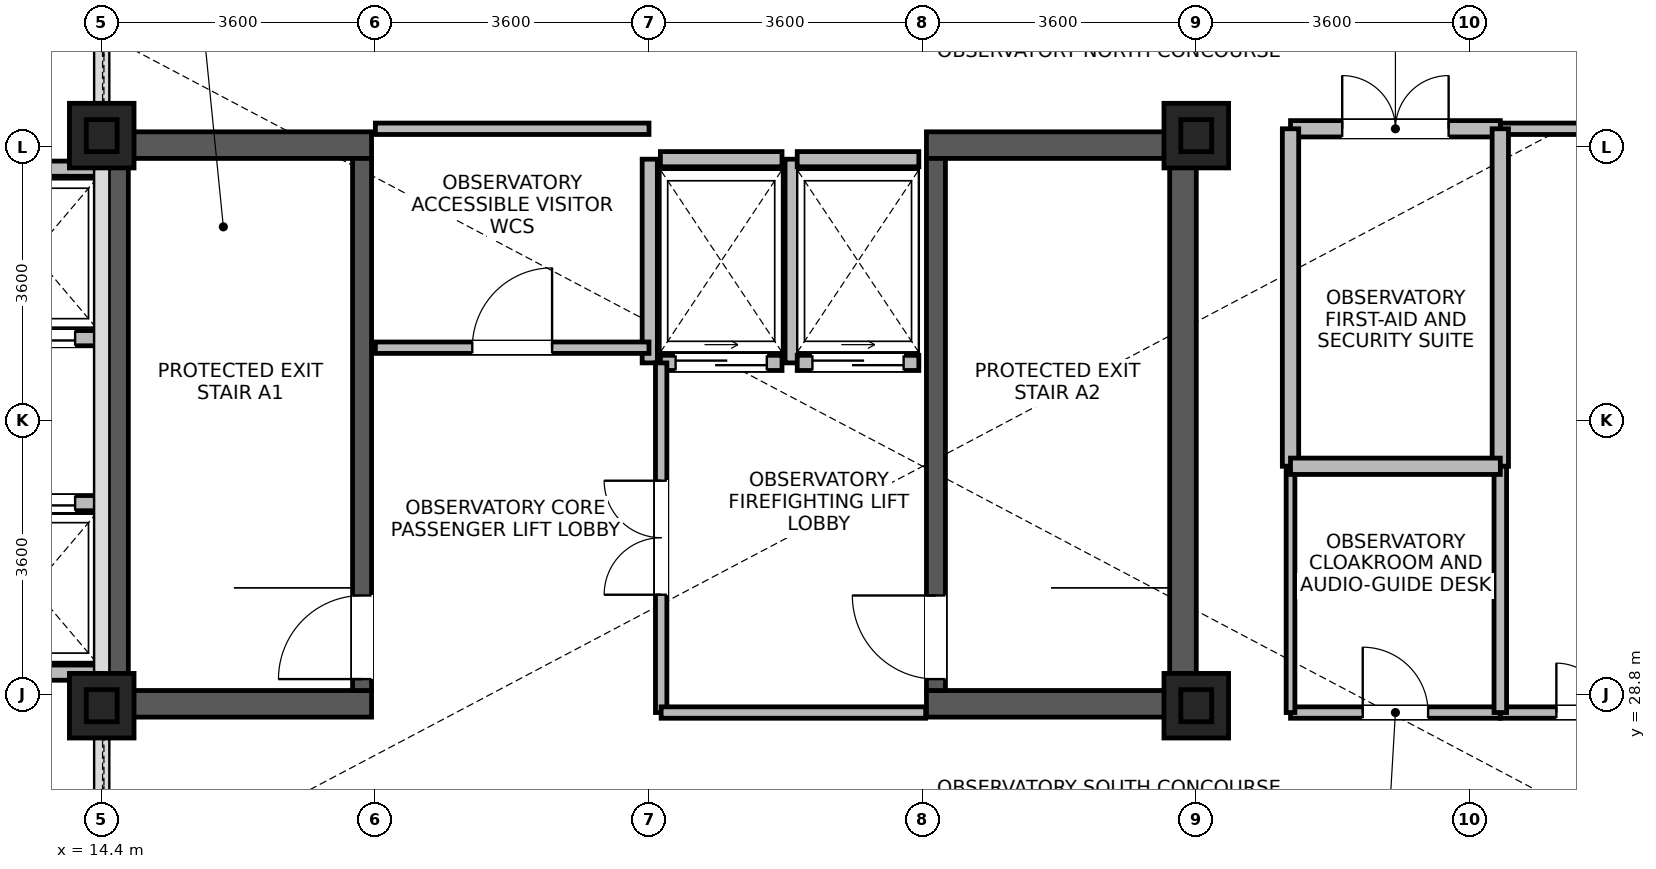
"""IFC4 building model, lengths in metres.
Left out: names, types, materials, properties, quantities, classifications, styles, units other than length and angle.
Written with IfcOpenShell. Run it as: python <this file> out.ifc"""

import sys

from ifc_helpers import new_model, si_unit, direction, frame, frame_2d, origin, origin_2d, place, context, subcontext, project, spatial, rectangle, i_section, extrude, source, transform, mapped, element, fill, save


model = new_model("IFC4")
c1 = context("Model", 3, precision=1e-05, world=origin(), true_north=direction((0.0, 1.0)))
c2 = subcontext(c1, "Body", "Model", "MODEL_VIEW")
j1 = project(units=[si_unit("LENGTHUNIT", "METRE"), si_unit("PLANEANGLEUNIT", "RADIAN")], contexts=[c1])
p1 = place(None, origin())
s1 = spatial("IfcSite", under=j1, at=p1, CompositionType="ELEMENT")
p2 = place(p1, origin())
s2 = spatial("IfcBuilding", under=s1, at=p2, CompositionType="ELEMENT")
p3 = place(p2, frame((0.0, 0.0, 298.0)))
s3 = spatial("IfcBuildingStorey", under=s2, at=p3, CompositionType="ELEMENT", Elevation=298.0)
for number, where, z_axis, x_axis in (
    (1, (14.575, 28.5, 0.0), (0.0, 0.0, 1.0), (0.0, 1.0, 0.0)),
    (2, (28.625, 28.5, 0.0), (0.0, 0.0, 1.0), (0.0, 1.0, 0.0)),
):
    element("IfcWall", number, at=place(p3, frame(where, z_axis=z_axis, x_axis=x_axis)), inside=s3, PredefinedType="SHEAR", context=c2, shape_type="SweptSolid", body=[
        extrude(rectangle(XDim=7.7, YDim=0.35, at=frame_2d((3.85, 0.0))), origin(), (0.0, 0.0, 1.0), 6.0),
    ])
for number, where, z_axis, x_axis in (
    (3, (14.75, 28.675, 0.0), (0.0, 0.0, 1.0), (1.0, 0.0, 0.0)),
    (4, (25.25, 28.675, 0.0), (0.0, 0.0, 1.0), (1.0, 0.0, 0.0)),
    (5, (14.75, 36.025, 0.0), (0.0, 0.0, 1.0), (1.0, 0.0, 0.0)),
    (6, (25.25, 36.025, 0.0), (0.0, 0.0, 1.0), (1.0, 0.0, 0.0)),
):
    element("IfcWall", number, at=place(p3, frame(where, z_axis=z_axis, x_axis=x_axis)), inside=s3, PredefinedType="SHEAR", context=c2, shape_type="SweptSolid", body=[
        extrude(rectangle(XDim=3.2, YDim=0.35, at=frame_2d((1.6, 0.0))), origin(), (0.0, 0.0, 1.0), 6.0),
    ])
p4 = place(p3, frame((17.825, 28.85, 0.0), z_axis=(0.0, 0.0, 1.0), x_axis=(0.0, 1.0, 0.0)))
e7 = element("IfcWall", 7, at=p4, inside=s3, PredefinedType="SHEAR", context=c2, shape_type="SweptSolid", body=[
    extrude(rectangle(XDim=7.0, YDim=0.25, at=frame_2d((3.5, 0.0))), origin(), (0.0, 0.0, 1.0), 6.0),
])
p5 = place(p4, frame((0.15, 0.0, 0.0)))
e8 = element("IfcOpeningElement", 8, at=p5, cuts=e7, PredefinedType="OPENING", context=c2, shape_type="SweptSolid", body=[
    extrude(rectangle(XDim=1.1, YDim=2.08, at=frame_2d((0.55, 1.04))), frame((0.0, 0.135, 0.0), z_axis=(0.0, -1.0, 0.0), x_axis=(1.0, 0.0, 0.0)), (0.0, 0.0, 1.0), 0.27),
])
p6 = place(p3, frame((25.375, 28.85, 0.0), z_axis=(0.0, 0.0, 1.0), x_axis=(0.0, 1.0, 0.0)))
e9 = element("IfcWall", 9, at=p6, inside=s3, PredefinedType="SHEAR", context=c2, shape_type="SweptSolid", body=[
    extrude(rectangle(XDim=7.0, YDim=0.25, at=frame_2d((3.5, 0.0))), origin(), (0.0, 0.0, 1.0), 6.0),
])
p7 = place(p6, frame((0.15, 0.0, 0.0)))
e10 = element("IfcOpeningElement", 10, at=p7, cuts=e9, PredefinedType="OPENING", context=c2, shape_type="SweptSolid", body=[
    extrude(rectangle(XDim=1.1, YDim=2.08, at=frame_2d((0.55, 1.04))), frame((0.0, 0.135, 0.0), z_axis=(0.0, -1.0, 0.0), x_axis=(1.0, 0.0, 0.0)), (0.0, 0.0, 1.0), 0.27),
])
m1 = source(origin(), c2, "Body", "SweptSolid", [
    extrude(rectangle(XDim=0.85, YDim=0.85, at=origin_2d()), origin(), (0.0, 0.0, 1.0), 6.0),
])
for number, where, z_axis, x_axis in (
    (11, (14.4, 28.65, 0.0), (0.0, 0.0, 1.0), (1.0, 0.0, 0.0)),
    (12, (14.4, 36.15, 0.0), (0.0, 0.0, 1.0), (1.0, 0.0, 0.0)),
    (13, (28.8, 28.65, 0.0), (0.0, 0.0, 1.0), (1.0, 0.0, 0.0)),
    (14, (28.8, 36.15, 0.0), (0.0, 0.0, 1.0), (1.0, 0.0, 0.0)),
):
    element("IfcColumn", number, at=place(p3, frame(where, z_axis=z_axis, x_axis=x_axis)), inside=s3, PredefinedType="COLUMN", context=c2, shape_type="MappedRepresentation", body=[
        mapped(m1, transform((0.0, 0.0, 0.0), x_axis=(1.0, 0.0, 0.0), y_axis=(0.0, 1.0, 0.0), z_axis=(0.0, 0.0, 1.0), scale=1.0)),
    ])
m2 = source(origin(), c2, "Body", "SweptSolid", [
    extrude(i_section(OverallWidth=0.406, OverallDepth=0.422, WebThickness=0.023, FlangeThickness=0.031, FilletRadius=0.015, at=origin_2d()), origin(), (0.0, 0.0, 1.0), 28.41),
])
p8 = place(p3, frame((14.4, 28.65, 6.0), z_axis=(0.0, 0.0, 1.0), x_axis=(1.0, 0.0, 0.0)))
e15 = element("IfcColumn", 15, at=p8, inside=s3, PredefinedType="COLUMN", context=c2, shape_type="MappedRepresentation", body=[
    mapped(m2, transform((0.0, 0.0, 0.0), x_axis=(1.0, 0.0, 0.0), y_axis=(0.0, 1.0, 0.0), z_axis=(0.0, 0.0, 1.0), scale=1.0)),
])
m3 = source(origin(), c2, "Body", "SweptSolid", [
    extrude(i_section(OverallWidth=0.406, OverallDepth=0.422, WebThickness=0.023, FlangeThickness=0.031, FilletRadius=0.015, at=origin_2d()), origin(), (0.0, 0.0, 1.0), 29.81),
])
for number, where, z_axis, x_axis in (
    (16, (28.8, 28.65, 6.0), (0.0, 0.0, 1.0), (1.0, 0.0, 0.0)),
    (17, (28.8, 36.15, 6.0), (0.0, 0.0, 1.0), (1.0, 0.0, 0.0)),
):
    element("IfcColumn", number, at=place(p3, frame(where, z_axis=z_axis, x_axis=x_axis)), inside=s3, PredefinedType="COLUMN", context=c2, shape_type="MappedRepresentation", body=[
        mapped(m3, transform((0.0, 0.0, 0.0), x_axis=(1.0, 0.0, 0.0), y_axis=(0.0, 1.0, 0.0), z_axis=(0.0, 0.0, 1.0), scale=1.0)),
    ])
p9 = place(p3, frame((14.4, 36.15, 6.0), z_axis=(0.0, 0.0, 1.0), x_axis=(1.0, 0.0, 0.0)))
e18 = element("IfcColumn", 18, at=p9, inside=s3, PredefinedType="COLUMN", context=c2, shape_type="MappedRepresentation", body=[
    mapped(m2, transform((0.0, 0.0, 0.0), x_axis=(1.0, 0.0, 0.0), y_axis=(0.0, 1.0, 0.0), z_axis=(0.0, 0.0, 1.0), scale=1.0)),
])
p10 = place(p3, frame((12.675, 33.485, 0.0), z_axis=(0.0, 0.0, 1.0), x_axis=(1.0, 0.0, 0.0)))
e19 = element("IfcWall", 19, at=p10, inside=s3, PredefinedType="PARTITIONING", context=c2, shape_type="SweptSolid", body=[
    extrude(rectangle(XDim=1.65, YDim=0.2, at=frame_2d((0.825, 0.0))), origin(), (0.0, 0.0, 1.0), 5.9),
])
p11 = place(p10, frame((0.275, 0.0, 0.0)))
e20 = element("IfcOpeningElement", 20, at=p11, cuts=e19, PredefinedType="OPENING", context=c2, shape_type="SweptSolid", body=[
    extrude(rectangle(XDim=1.1, YDim=2.12, at=frame_2d((0.55, 1.06))), frame((0.0, 0.11, 0.0), z_axis=(0.0, -1.0, 0.0), x_axis=(1.0, 0.0, 0.0)), (0.0, 0.0, 1.0), 0.22),
])
for number, where, z_axis, x_axis in (
    (21, (12.675, 35.715, 0.0), (0.0, 0.0, 1.0), (1.0, 0.0, 0.0)),
    (22, (12.675, 29.085, 0.0), (0.0, 0.0, 1.0), (1.0, 0.0, 0.0)),
):
    element("IfcWall", number, at=place(p3, frame(where, z_axis=z_axis, x_axis=x_axis)), inside=s3, PredefinedType="PARTITIONING", context=c2, shape_type="SweptSolid", body=[
        extrude(rectangle(XDim=1.65, YDim=0.2, at=frame_2d((0.825, 0.0))), origin(), (0.0, 0.0, 1.0), 5.9),
    ])
p12 = place(p3, frame((12.675, 31.315, 0.0), z_axis=(0.0, 0.0, 1.0), x_axis=(1.0, 0.0, 0.0)))
e23 = element("IfcWall", 23, at=p12, inside=s3, PredefinedType="PARTITIONING", context=c2, shape_type="SweptSolid", body=[
    extrude(rectangle(XDim=1.65, YDim=0.2, at=frame_2d((0.825, 0.0))), origin(), (0.0, 0.0, 1.0), 5.9),
])
p13 = place(p12, frame((0.275, 0.0, 0.0)))
e24 = element("IfcOpeningElement", 24, at=p13, cuts=e23, PredefinedType="OPENING", context=c2, shape_type="SweptSolid", body=[
    extrude(rectangle(XDim=1.1, YDim=2.12, at=frame_2d((0.55, 1.06))), frame((0.0, 0.11, 0.0), z_axis=(0.0, -1.0, 0.0), x_axis=(1.0, 0.0, 0.0)), (0.0, 0.0, 1.0), 0.22),
])
p14 = place(p3, frame((21.75, 33.16, 0.0), z_axis=(0.0, 0.0, 1.0), x_axis=(1.0, 0.0, 0.0)))
e25 = element("IfcWall", 25, at=p14, inside=s3, PredefinedType="PARTITIONING", context=c2, shape_type="SweptSolid", body=[
    extrude(rectangle(XDim=1.6, YDim=0.2, at=frame_2d((0.8, 0.0))), origin(), (0.0, 0.0, 1.0), 5.9),
])
p15 = place(p14, frame((0.2, 0.0, 0.0)))
e26 = element("IfcOpeningElement", 26, at=p15, cuts=e25, PredefinedType="OPENING", context=c2, shape_type="SweptSolid", body=[
    extrude(rectangle(XDim=1.2, YDim=2.12, at=frame_2d((0.6, 1.06))), frame((0.0, 0.11, 0.0), z_axis=(0.0, -1.0, 0.0), x_axis=(1.0, 0.0, 0.0)), (0.0, 0.0, 1.0), 0.22),
])
p16 = place(p3, frame((21.75, 35.84, 0.0), z_axis=(0.0, 0.0, 1.0), x_axis=(1.0, 0.0, 0.0)))
e27 = element("IfcWall", 27, at=p16, inside=s3, PredefinedType="PARTITIONING", context=c2, shape_type="SweptSolid", body=[
    extrude(rectangle(XDim=1.6, YDim=0.2, at=frame_2d((0.8, 0.0))), origin(), (0.0, 0.0, 1.0), 5.08),
])
for number, where, z_axis, x_axis in (
    (28, (21.61, 33.16, 0.0), (0.0, 0.0, 1.0), (0.0, 1.0, 0.0)),
    (29, (23.49, 33.16, 0.0), (0.0, 0.0, 1.0), (0.0, 1.0, 0.0)),
):
    element("IfcWall", number, at=place(p3, frame(where, z_axis=z_axis, x_axis=x_axis)), inside=s3, PredefinedType="PARTITIONING", context=c2, shape_type="SweptSolid", body=[
        extrude(rectangle(XDim=2.68, YDim=0.2, at=frame_2d((1.34, 0.0))), origin(), (0.0, 0.0, 1.0), 5.9),
    ])
p17 = place(p3, frame((23.55, 33.16, 0.0), z_axis=(0.0, 0.0, 1.0), x_axis=(1.0, 0.0, 0.0)))
e30 = element("IfcWall", 30, at=p17, inside=s3, PredefinedType="PARTITIONING", context=c2, shape_type="SweptSolid", body=[
    extrude(rectangle(XDim=1.6, YDim=0.2, at=frame_2d((0.8, 0.0))), origin(), (0.0, 0.0, 1.0), 5.9),
])
p18 = place(p17, frame((0.2, 0.0, 0.0)))
e31 = element("IfcOpeningElement", 31, at=p18, cuts=e30, PredefinedType="OPENING", context=c2, shape_type="SweptSolid", body=[
    extrude(rectangle(XDim=1.2, YDim=2.12, at=frame_2d((0.6, 1.06))), frame((0.0, 0.11, 0.0), z_axis=(0.0, -1.0, 0.0), x_axis=(1.0, 0.0, 0.0)), (0.0, 0.0, 1.0), 0.22),
])
p19 = place(p3, frame((23.55, 35.84, 0.0), z_axis=(0.0, 0.0, 1.0), x_axis=(1.0, 0.0, 0.0)))
e32 = element("IfcWall", 32, at=p19, inside=s3, PredefinedType="PARTITIONING", context=c2, shape_type="SweptSolid", body=[
    extrude(rectangle(XDim=1.6, YDim=0.2, at=frame_2d((0.8, 0.0))), origin(), (0.0, 0.0, 1.0), 5.08),
])
p20 = place(p3, frame((32.8, 28.56, 0.0), z_axis=(0.0, 0.0, 1.0), x_axis=(1.0, 0.0, 0.0)))
e33 = element("IfcWall", 33, at=p20, inside=s3, PredefinedType="PARTITIONING", context=c2, shape_type="SweptSolid", body=[
    extrude(rectangle(XDim=2.775, YDim=0.15, at=frame_2d((1.387, 0.0))), origin(), (0.0, 0.0, 1.0), 5.43),
])
p21 = place(p20, frame((0.738, 0.0, 0.0)))
e34 = element("IfcOpeningElement", 34, at=p21, cuts=e33, PredefinedType="OPENING", context=c2, shape_type="SweptSolid", body=[
    extrude(rectangle(XDim=1.3, YDim=2.12, at=frame_2d((0.65, 1.06))), frame((0.0, 0.085, 0.0), z_axis=(0.0, -1.0, 0.0), x_axis=(1.0, 0.0, 0.0)), (0.0, 0.0, 1.0), 0.17),
])
p22 = place(p3, frame((32.8, 36.24, 0.0), z_axis=(0.0, 0.0, 1.0), x_axis=(1.0, 0.0, 0.0)))
e35 = element("IfcWall", 35, at=p22, inside=s3, PredefinedType="PARTITIONING", context=c2, shape_type="SweptSolid", body=[
    extrude(rectangle(XDim=2.775, YDim=0.15, at=frame_2d((1.387, 0.0))), origin(), (0.0, 0.0, 1.0), 5.43),
])
p23 = place(p3, frame((18.0, 33.36, 0.0), z_axis=(0.0, 0.0, 1.0), x_axis=(1.0, 0.0, 0.0)))
e36 = element("IfcWall", 36, at=p23, inside=s3, PredefinedType="PARTITIONING", context=c2, shape_type="SweptSolid", body=[
    extrude(rectangle(XDim=3.6, YDim=0.15, at=frame_2d((1.8, 0.0))), origin(), (0.0, 0.0, 1.0), 5.9),
])
p24 = place(p23, frame((1.275, 0.0, 0.0)))
e37 = element("IfcOpeningElement", 37, at=p24, cuts=e36, PredefinedType="OPENING", context=c2, shape_type="SweptSolid", body=[
    extrude(rectangle(XDim=1.05, YDim=2.12, at=frame_2d((0.525, 1.06))), frame((0.0, 0.085, 0.0), z_axis=(0.0, -1.0, 0.0), x_axis=(1.0, 0.0, 0.0)), (0.0, 0.0, 1.0), 0.17),
])
p25 = place(p3, frame((18.0, 36.24, 0.0), z_axis=(0.0, 0.0, 1.0), x_axis=(1.0, 0.0, 0.0)))
e38 = element("IfcWall", 38, at=p25, inside=s3, PredefinedType="PARTITIONING", context=c2, shape_type="SweptSolid", body=[
    extrude(rectangle(XDim=3.6, YDim=0.15, at=frame_2d((1.8, 0.0))), origin(), (0.0, 0.0, 1.0), 5.08),
])
p26 = place(p3, frame((30.04, 28.56, 0.0), z_axis=(0.0, 0.0, 1.0), x_axis=(1.0, 0.0, 0.0)))
e39 = element("IfcWall", 39, at=p26, inside=s3, PredefinedType="PARTITIONING", context=c2, shape_type="SweptSolid", body=[
    extrude(rectangle(XDim=2.76, YDim=0.15, at=frame_2d((1.38, 0.0))), origin(), (0.0, 0.0, 1.0), 5.43),
])
p27 = place(p26, frame((0.95, 0.0, 0.0)))
e40 = element("IfcOpeningElement", 40, at=p27, cuts=e39, PredefinedType="OPENING", context=c2, shape_type="SweptSolid", body=[
    extrude(rectangle(XDim=0.86, YDim=2.02, at=frame_2d((0.43, 1.01))), frame((0.0, 0.085, 0.0), z_axis=(0.0, -1.0, 0.0), x_axis=(1.0, 0.0, 0.0)), (0.0, 0.0, 1.0), 0.17),
])
p28 = place(p3, frame((30.04, 36.24, 0.0), z_axis=(0.0, 0.0, 1.0), x_axis=(1.0, 0.0, 0.0)))
e41 = element("IfcWall", 41, at=p28, inside=s3, PredefinedType="PARTITIONING", context=c2, shape_type="SweptSolid", body=[
    extrude(rectangle(XDim=2.76, YDim=0.215, at=frame_2d((1.38, 0.0))), origin(), (0.0, 0.0, 1.0), 5.43),
])
p29 = place(p28, frame((0.68, 0.0, 0.0)))
e42 = element("IfcOpeningElement", 42, at=p29, cuts=e41, PredefinedType="OPENING", context=c2, shape_type="SweptSolid", body=[
    extrude(rectangle(XDim=1.4, YDim=2.15, at=frame_2d((0.7, 1.075))), frame((0.0, 0.118, 0.0), z_axis=(0.0, -1.0, 0.0), x_axis=(1.0, 0.0, 0.0)), (0.0, 0.0, 1.0), 0.235),
])
p30 = place(p3, frame((21.76, 28.56, 0.0), z_axis=(0.0, 0.0, 1.0), x_axis=(0.0, 1.0, 0.0)))
e43 = element("IfcWall", 43, at=p30, inside=s3, PredefinedType="PARTITIONING", context=c2, shape_type="SweptSolid", body=[
    extrude(rectangle(XDim=4.6, YDim=0.15, at=frame_2d((2.3, 0.0))), origin(), (0.0, 0.0, 1.0), 5.9),
])
p31 = place(p30, frame((1.55, 0.0, 0.0)))
e44 = element("IfcOpeningElement", 44, at=p31, cuts=e43, PredefinedType="OPENING", context=c2, shape_type="SweptSolid", body=[
    extrude(rectangle(XDim=1.5, YDim=2.1, at=frame_2d((0.75, 1.05))), frame((0.0, 0.085, 0.0), z_axis=(0.0, -1.0, 0.0), x_axis=(1.0, 0.0, 0.0)), (0.0, 0.0, 1.0), 0.17),
])
for number, where, z_axis, x_axis in (
    (45, (30.04, 31.8, 0.0), (0.0, 0.0, 1.0), (0.0, 1.0, 0.0)),
    (46, (32.8, 31.8, 0.0), (0.0, 0.0, 1.0), (0.0, 1.0, 0.0)),
):
    element("IfcWall", number, at=place(p3, frame(where, z_axis=z_axis, x_axis=x_axis)), inside=s3, PredefinedType="PARTITIONING", context=c2, shape_type="SweptSolid", body=[
        extrude(rectangle(XDim=4.44, YDim=0.215, at=frame_2d((2.22, 0.0))), origin(), (0.0, 0.0, 1.0), 5.9),
    ])
p32 = place(p3, frame((21.76, 28.56, 0.0), z_axis=(0.0, 0.0, 1.0), x_axis=(1.0, 0.0, 0.0)))
e47 = element("IfcWall", 47, at=p32, inside=s3, PredefinedType="PARTITIONING", context=c2, shape_type="SweptSolid", body=[
    extrude(rectangle(XDim=3.48, YDim=0.15, at=frame_2d((1.74, 0.0))), origin(), (0.0, 0.0, 1.0), 5.08),
])
p33 = place(p3, frame((30.04, 28.56, 0.0), z_axis=(0.0, 0.0, 1.0), x_axis=(0.0, 1.0, 0.0)))
e48 = element("IfcWall", 48, at=p33, inside=s3, PredefinedType="PARTITIONING", context=c2, shape_type="SweptSolid", body=[
    extrude(rectangle(XDim=3.24, YDim=0.115, at=frame_2d((1.62, 0.0))), origin(), (0.0, 0.0, 1.0), 5.9),
])
p34 = place(p3, frame((32.8, 28.56, 0.0), z_axis=(0.0, 0.0, 1.0), x_axis=(0.0, 1.0, 0.0)))
e49 = element("IfcWall", 49, at=p34, inside=s3, PredefinedType="PARTITIONING", context=c2, shape_type="SweptSolid", body=[
    extrude(rectangle(XDim=3.24, YDim=0.165, at=frame_2d((1.62, 0.0))), origin(), (0.0, 0.0, 1.0), 5.9),
])
p35 = place(p3, frame((30.04, 31.8, 0.0), z_axis=(0.0, 0.0, 1.0), x_axis=(1.0, 0.0, 0.0)))
e50 = element("IfcWall", 50, at=p35, inside=s3, PredefinedType="PARTITIONING", context=c2, shape_type="SweptSolid", body=[
    extrude(rectangle(XDim=2.76, YDim=0.215, at=frame_2d((1.38, 0.0))), origin(), (0.0, 0.0, 1.0), 5.9),
])
p36 = place(p5, origin())
e51 = element("IfcDoor", 51, at=p36, inside=s3, OperationType="SINGLE_SWING_LEFT", PredefinedType="DOOR", context=c2, shape_type="SweptSolid", body=[
    extrude(rectangle(XDim=1.1, YDim=2.08, at=frame_2d((0.55, 1.04))), frame((0.0, 0.025, 0.0), z_axis=(0.0, -1.0, 0.0), x_axis=(1.0, 0.0, 0.0)), (0.0, 0.0, 1.0), 0.05),
])
fill(e8, e51)
p37 = place(p7, origin())
e52 = element("IfcDoor", 52, at=p37, inside=s3, OperationType="SINGLE_SWING_RIGHT", PredefinedType="DOOR", context=c2, shape_type="SweptSolid", body=[
    extrude(rectangle(XDim=1.1, YDim=2.08, at=frame_2d((0.55, 1.04))), frame((0.0, 0.025, 0.0), z_axis=(0.0, -1.0, 0.0), x_axis=(1.0, 0.0, 0.0)), (0.0, 0.0, 1.0), 0.05),
])
fill(e10, e52)
p38 = place(p11, origin())
e53 = element("IfcDoor", 53, at=p38, inside=s3, OperationType="SLIDING_TO_LEFT", PredefinedType="DOOR", context=c2, shape_type="SweptSolid", body=[
    extrude(rectangle(XDim=1.1, YDim=2.12, at=frame_2d((0.55, 1.06))), frame((0.0, 0.025, 0.0), z_axis=(0.0, -1.0, 0.0), x_axis=(1.0, 0.0, 0.0)), (0.0, 0.0, 1.0), 0.05),
])
fill(e20, e53)
p39 = place(p13, origin())
e54 = element("IfcDoor", 54, at=p39, inside=s3, OperationType="SLIDING_TO_LEFT", PredefinedType="DOOR", context=c2, shape_type="SweptSolid", body=[
    extrude(rectangle(XDim=1.1, YDim=2.12, at=frame_2d((0.55, 1.06))), frame((0.0, 0.025, 0.0), z_axis=(0.0, -1.0, 0.0), x_axis=(1.0, 0.0, 0.0)), (0.0, 0.0, 1.0), 0.05),
])
fill(e24, e54)
p40 = place(p15, origin())
e55 = element("IfcDoor", 55, at=p40, inside=s3, OperationType="SLIDING_TO_RIGHT", PredefinedType="DOOR", context=c2, shape_type="SweptSolid", body=[
    extrude(rectangle(XDim=1.2, YDim=2.12, at=frame_2d((0.6, 1.06))), frame((0.0, 0.025, 0.0), z_axis=(0.0, -1.0, 0.0), x_axis=(1.0, 0.0, 0.0)), (0.0, 0.0, 1.0), 0.05),
])
fill(e26, e55)
p41 = place(p18, origin())
e56 = element("IfcDoor", 56, at=p41, inside=s3, OperationType="SLIDING_TO_RIGHT", PredefinedType="DOOR", context=c2, shape_type="SweptSolid", body=[
    extrude(rectangle(XDim=1.2, YDim=2.12, at=frame_2d((0.6, 1.06))), frame((0.0, 0.025, 0.0), z_axis=(0.0, -1.0, 0.0), x_axis=(1.0, 0.0, 0.0)), (0.0, 0.0, 1.0), 0.05),
])
fill(e31, e56)
p42 = place(p21, origin())
e57 = element("IfcDoor", 57, at=p42, inside=s3, OperationType="DOUBLE_DOOR_SINGLE_SWING", PredefinedType="DOOR", context=c2, shape_type="SweptSolid", body=[
    extrude(rectangle(XDim=1.3, YDim=2.12, at=frame_2d((0.65, 1.06))), frame((0.0, 0.025, 0.0), z_axis=(0.0, -1.0, 0.0), x_axis=(1.0, 0.0, 0.0)), (0.0, 0.0, 1.0), 0.05),
])
fill(e34, e57)
p43 = place(p24, origin())
e58 = element("IfcDoor", 58, at=p43, inside=s3, OperationType="SINGLE_SWING_RIGHT", PredefinedType="DOOR", context=c2, shape_type="SweptSolid", body=[
    extrude(rectangle(XDim=1.05, YDim=2.12, at=frame_2d((0.525, 1.06))), frame((0.0, 0.025, 0.0), z_axis=(0.0, -1.0, 0.0), x_axis=(1.0, 0.0, 0.0)), (0.0, 0.0, 1.0), 0.05),
])
fill(e37, e58)
p44 = place(p27, origin())
e59 = element("IfcDoor", 59, at=p44, inside=s3, OperationType="SINGLE_SWING_LEFT", PredefinedType="DOOR", context=c2, shape_type="SweptSolid", body=[
    extrude(rectangle(XDim=0.86, YDim=2.02, at=frame_2d((0.43, 1.01))), frame((0.0, 0.025, 0.0), z_axis=(0.0, -1.0, 0.0), x_axis=(1.0, 0.0, 0.0)), (0.0, 0.0, 1.0), 0.05),
])
fill(e40, e59)
p45 = place(p29, origin())
e60 = element("IfcDoor", 60, at=p45, inside=s3, OperationType="DOUBLE_DOOR_SINGLE_SWING", PredefinedType="DOOR", context=c2, shape_type="SweptSolid", body=[
    extrude(rectangle(XDim=1.4, YDim=2.15, at=frame_2d((0.7, 1.075))), frame((0.0, 0.025, 0.0), z_axis=(0.0, -1.0, 0.0), x_axis=(1.0, 0.0, 0.0)), (0.0, 0.0, 1.0), 0.05),
])
fill(e42, e60)
p46 = place(p31, origin())
e61 = element("IfcDoor", 61, at=p46, inside=s3, OperationType="DOUBLE_DOOR_SINGLE_SWING", PredefinedType="DOOR", context=c2, shape_type="SweptSolid", body=[
    extrude(rectangle(XDim=1.5, YDim=2.1, at=frame_2d((0.75, 1.05))), frame((0.0, 0.025, 0.0), z_axis=(0.0, -1.0, 0.0), x_axis=(1.0, 0.0, 0.0)), (0.0, 0.0, 1.0), 0.05),
])
fill(e44, e61)
save(model, sys.argv[1])
